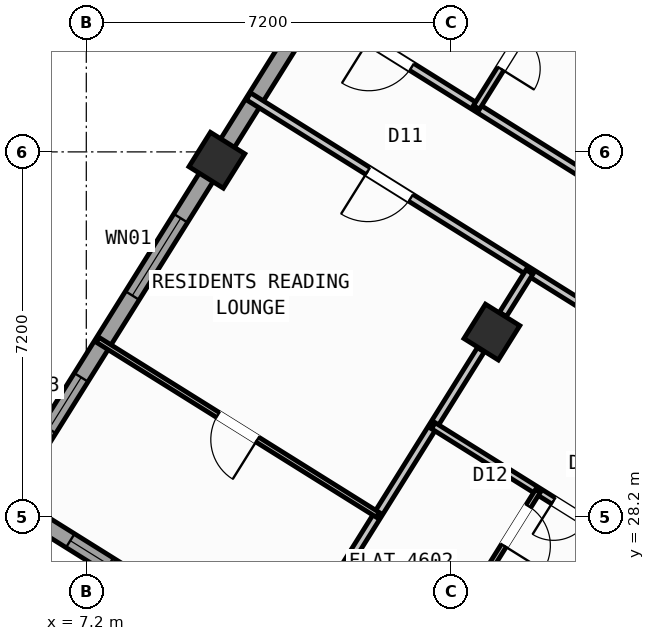
"""IFC4 building model, lengths in metres.
Left out: names, types, materials, properties, quantities, classifications, styles, units other than length and angle.
Written with IfcOpenShell. Run it as: python <this file> out.ifc"""

import sys

from ifc_helpers import new_model, si_unit, direction, frame, frame_2d, origin, origin_2d, place, context, subcontext, project, spatial, rectangle, hollow_rectangle, extrude, source, transform, mapped, element, fill, save


model = new_model("IFC4")
c1 = context("Model", 3, precision=1e-05, world=origin(), true_north=direction((0.0, 1.0)))
c2 = subcontext(c1, "Body", "Model", "MODEL_VIEW")
j1 = project(units=[si_unit("LENGTHUNIT", "METRE"), si_unit("PLANEANGLEUNIT", "RADIAN")], contexts=[c1])
p1 = place(None, origin())
s1 = spatial("IfcSite", under=j1, at=p1, CompositionType="ELEMENT")
p2 = place(p1, origin())
s2 = spatial("IfcBuilding", under=s1, at=p2, CompositionType="ELEMENT")
p3 = place(p2, frame((0.0, 0.0, 184.2)))
s3 = spatial("IfcBuildingStorey", under=s2, at=p3, CompositionType="ELEMENT", Elevation=184.2)
m1 = source(origin(), c2, "Body", "SweptSolid", [
    extrude(hollow_rectangle(XDim=0.8, YDim=0.8, WallThickness=0.032, at=origin_2d()), origin(), (0.0, 0.0, 1.0), 3.6),
])
for number, where, z_axis, x_axis in (
    (1, (15.205, 31.844, 0.0), (0.0, 0.0, 1.0), (-0.848, 0.53, 0.0)),
    (2, (9.777, 35.235, 0.0), (0.0, 0.0, 1.0), (-0.848, 0.53, 0.0)),
):
    element("IfcColumn", number, at=place(p3, frame(where, z_axis=z_axis, x_axis=x_axis)), inside=s3, PredefinedType="COLUMN", context=c2, shape_type="MappedRepresentation", body=[
        mapped(m1, transform((0.0, 0.0, 0.0), scale=1.0)),
    ])
p4 = place(p3, frame((31.76, 12.183, 0.0), z_axis=(0.0, 0.0, 1.0), x_axis=(-0.848047074256, 0.529920899612, 0.0)))
e3 = element("IfcWall", 3, at=p4, inside=s3, PredefinedType="STANDARD", context=c2, shape_type="SweptSolid", body=[
    extrude(rectangle(XDim=30.652, YDim=0.32, at=frame_2d((15.326, 0.0))), origin(), (0.0, 0.0, 1.0), 3.35),
])
p5 = place(p4, frame((15.166, 0.0, 0.0)))
e4 = element("IfcOpeningElement", 4, at=p5, cuts=e3, PredefinedType="OPENING", context=c2, shape_type="SweptSolid", body=[
    extrude(rectangle(XDim=1.2, YDim=2.15, at=frame_2d((0.6, 1.075))), frame((0.0, 0.17, 0.0), z_axis=(0.0, -1.0, 0.0), x_axis=(1.0, 0.0, 0.0)), (0.0, 0.0, 1.0), 0.34),
])
p6 = place(p4, frame((2.015, 0.0, 0.8)))
e5 = element("IfcOpeningElement", 5, at=p6, cuts=e3, PredefinedType="OPENING", context=c2, shape_type="SweptSolid", body=[
    extrude(rectangle(XDim=2.1, YDim=1.55, at=frame_2d((1.05, 0.775))), frame((0.0, 0.17, 0.0), z_axis=(0.0, -1.0, 0.0), x_axis=(1.0, 0.0, 0.0)), (0.0, 0.0, 1.0), 0.34),
])
p7 = place(p4, frame((7.244, 0.0, 0.8)))
e6 = element("IfcOpeningElement", 6, at=p7, cuts=e3, PredefinedType="OPENING", context=c2, shape_type="SweptSolid", body=[
    extrude(rectangle(XDim=2.1, YDim=1.55, at=frame_2d((1.05, 0.775))), frame((0.0, 0.17, 0.0), z_axis=(0.0, -1.0, 0.0), x_axis=(1.0, 0.0, 0.0)), (0.0, 0.0, 1.0), 0.34),
])
p8 = place(p4, frame((12.623, 0.0, 1.0)))
e7 = element("IfcOpeningElement", 7, at=p8, cuts=e3, PredefinedType="OPENING", context=c2, shape_type="SweptSolid", body=[
    extrude(rectangle(XDim=0.9, YDim=1.25, at=frame_2d((0.45, 0.625))), frame((0.0, 0.17, 0.0), z_axis=(0.0, -1.0, 0.0), x_axis=(1.0, 0.0, 0.0)), (0.0, 0.0, 1.0), 0.34),
])
p9 = place(p4, frame((19.565, 0.0, 0.95)))
e8 = element("IfcOpeningElement", 8, at=p9, cuts=e3, PredefinedType="OPENING", context=c2, shape_type="SweptSolid", body=[
    extrude(rectangle(XDim=1.2, YDim=1.4, at=frame_2d((0.6, 0.7))), frame((0.0, 0.17, 0.0), z_axis=(0.0, -1.0, 0.0), x_axis=(1.0, 0.0, 0.0)), (0.0, 0.0, 1.0), 0.34),
])
p10 = place(p4, frame((25.983, 0.0, 1.0)))
e9 = element("IfcOpeningElement", 9, at=p10, cuts=e3, PredefinedType="OPENING", context=c2, shape_type="SweptSolid", body=[
    extrude(rectangle(XDim=0.9, YDim=1.25, at=frame_2d((0.45, 0.625))), frame((0.0, 0.17, 0.0), z_axis=(0.0, -1.0, 0.0), x_axis=(1.0, 0.0, 0.0)), (0.0, 0.0, 1.0), 0.34),
])
p11 = place(p4, frame((28.433, 0.0, 1.0)))
e10 = element("IfcOpeningElement", 10, at=p11, cuts=e3, PredefinedType="OPENING", context=c2, shape_type="SweptSolid", body=[
    extrude(rectangle(XDim=0.9, YDim=1.25, at=frame_2d((0.45, 0.625))), frame((0.0, 0.17, 0.0), z_axis=(0.0, -1.0, 0.0), x_axis=(1.0, 0.0, 0.0)), (0.0, 0.0, 1.0), 0.34),
])
p12 = place(p3, frame((5.7, 28.71, 0.0), z_axis=(0.0, 0.0, 1.0), x_axis=(0.529923711467, 0.8480453172, 0.0)))
e11 = element("IfcWall", 11, at=p12, inside=s3, PredefinedType="STANDARD", context=c2, shape_type="SweptSolid", body=[
    extrude(rectangle(XDim=21.587, YDim=0.32, at=frame_2d((10.794, 0.0))), origin(), (0.0, 0.0, 1.0), 2.825),
])
p13 = place(p12, frame((1.44, 0.0, 0.95)))
e12 = element("IfcOpeningElement", 12, at=p13, cuts=e11, PredefinedType="OPENING", context=c2, shape_type="SweptSolid", body=[
    extrude(rectangle(XDim=1.2, YDim=1.4, at=frame_2d((0.6, 0.7))), frame((0.0, 0.17, 0.0), z_axis=(0.0, -1.0, 0.0), x_axis=(1.0, 0.0, 0.0)), (0.0, 0.0, 1.0), 0.34),
])
p14 = place(p12, frame((4.545, 0.0, 0.85)))
e13 = element("IfcOpeningElement", 13, at=p14, cuts=e11, PredefinedType="OPENING", context=c2, shape_type="SweptSolid", body=[
    extrude(rectangle(XDim=1.8, YDim=1.5, at=frame_2d((0.9, 0.75))), frame((0.0, 0.17, 0.0), z_axis=(0.0, -1.0, 0.0), x_axis=(1.0, 0.0, 0.0)), (0.0, 0.0, 1.0), 0.34),
])
p15 = place(p12, frame((12.139, 0.0, 1.0)))
e14 = element("IfcOpeningElement", 14, at=p15, cuts=e11, PredefinedType="OPENING", context=c2, shape_type="SweptSolid", body=[
    extrude(rectangle(XDim=0.9, YDim=1.25, at=frame_2d((0.45, 0.625))), frame((0.0, 0.17, 0.0), z_axis=(0.0, -1.0, 0.0), x_axis=(1.0, 0.0, 0.0)), (0.0, 0.0, 1.0), 0.34),
])
p16 = place(p12, frame((16.35, 0.0, 0.95)))
e15 = element("IfcOpeningElement", 15, at=p16, cuts=e11, PredefinedType="OPENING", context=c2, shape_type="SweptSolid", body=[
    extrude(rectangle(XDim=1.2, YDim=1.4, at=frame_2d((0.6, 0.7))), frame((0.0, 0.17, 0.0), z_axis=(0.0, -1.0, 0.0), x_axis=(1.0, 0.0, 0.0)), (0.0, 0.0, 1.0), 0.34),
])
p17 = place(p12, frame((18.762, 0.0, 0.95)))
e16 = element("IfcOpeningElement", 16, at=p17, cuts=e11, PredefinedType="OPENING", context=c2, shape_type="SweptSolid", body=[
    extrude(rectangle(XDim=1.2, YDim=1.4, at=frame_2d((0.6, 0.7))), frame((0.0, 0.17, 0.0), z_axis=(0.0, -1.0, 0.0), x_axis=(1.0, 0.0, 0.0)), (0.0, 0.0, 1.0), 0.34),
])
p18 = place(p3, frame((25.754, 29.497, 0.0), z_axis=(0.0, 0.0, 1.0), x_axis=(-0.848045850158, 0.529922858565, 0.0)))
e17 = element("IfcWall", 17, at=p18, inside=s3, PredefinedType="PARTITIONING", context=c2, shape_type="SweptSolid", body=[
    extrude(rectangle(XDim=16.73, YDim=0.16, at=frame_2d((8.365, 0.0))), origin(), (0.0, 0.0, 1.0), 3.34),
])
p19 = place(p18, frame((2.22, 0.0, 0.0)))
e18 = element("IfcOpeningElement", 18, at=p19, cuts=e17, PredefinedType="OPENING", context=c2, shape_type="SweptSolid", body=[
    extrude(rectangle(XDim=0.86, YDim=2.05, at=frame_2d((0.43, 1.025))), frame((0.0, 0.09, 0.0), z_axis=(0.0, -1.0, 0.0), x_axis=(1.0, 0.0, 0.0)), (0.0, 0.0, 1.0), 0.18),
])
p20 = place(p18, frame((6.49, 0.0, 0.0)))
e19 = element("IfcOpeningElement", 19, at=p20, cuts=e17, PredefinedType="OPENING", context=c2, shape_type="SweptSolid", body=[
    extrude(rectangle(XDim=1.0, YDim=2.1, at=frame_2d((0.5, 1.05))), frame((0.0, 0.09, 0.0), z_axis=(0.0, -1.0, 0.0), x_axis=(1.0, 0.0, 0.0)), (0.0, 0.0, 1.0), 0.18),
])
p21 = place(p18, frame((14.304, 0.0, 0.0)))
e20 = element("IfcOpeningElement", 20, at=p21, cuts=e17, PredefinedType="OPENING", context=c2, shape_type="SweptSolid", body=[
    extrude(rectangle(XDim=1.0, YDim=2.1, at=frame_2d((0.5, 1.05))), frame((0.0, 0.09, 0.0), z_axis=(0.0, -1.0, 0.0), x_axis=(1.0, 0.0, 0.0)), (0.0, 0.0, 1.0), 0.18),
])
p22 = place(p3, frame((24.588, 27.631, 0.0), z_axis=(0.0, 0.0, 1.0), x_axis=(-0.848041752158, 0.529929416617, 0.0)))
e21 = element("IfcWall", 21, at=p22, inside=s3, PredefinedType="PARTITIONING", context=c2, shape_type="SweptSolid", body=[
    extrude(rectangle(XDim=16.73, YDim=0.16, at=frame_2d((8.365, 0.0))), origin(), (0.0, 0.0, 1.0), 3.34),
])
p23 = place(p22, frame((2.22, 0.0, 0.0)))
e22 = element("IfcOpeningElement", 22, at=p23, cuts=e21, PredefinedType="OPENING", context=c2, shape_type="SweptSolid", body=[
    extrude(rectangle(XDim=0.86, YDim=2.05, at=frame_2d((0.43, 1.025))), frame((0.0, 0.09, 0.0), z_axis=(0.0, -1.0, 0.0), x_axis=(1.0, 0.0, 0.0)), (0.0, 0.0, 1.0), 0.18),
])
p24 = place(p22, frame((7.82, 0.0, 0.0)))
e23 = element("IfcOpeningElement", 23, at=p24, cuts=e21, PredefinedType="OPENING", context=c2, shape_type="SweptSolid", body=[
    extrude(rectangle(XDim=1.0, YDim=2.1, at=frame_2d((0.5, 1.05))), frame((0.0, 0.09, 0.0), z_axis=(0.0, -1.0, 0.0), x_axis=(1.0, 0.0, 0.0)), (0.0, 0.0, 1.0), 0.18),
])
p25 = place(p22, frame((12.95, 0.0, 0.0)))
e24 = element("IfcOpeningElement", 24, at=p25, cuts=e21, PredefinedType="OPENING", context=c2, shape_type="SweptSolid", body=[
    extrude(rectangle(XDim=1.0, YDim=2.1, at=frame_2d((0.5, 1.05))), frame((0.0, 0.09, 0.0), z_axis=(0.0, -1.0, 0.0), x_axis=(1.0, 0.0, 0.0)), (0.0, 0.0, 1.0), 0.18),
])
p26 = place(p3, frame((15.946, 33.031, 0.0), z_axis=(0.0, 0.0, 1.0), x_axis=(-0.529821225456, -0.848109349704, 0.0)))
e25 = element("IfcWall", 25, at=p26, inside=s3, PredefinedType="PARTITIONING", context=c2, shape_type="SweptSolid", body=[
    extrude(rectangle(XDim=0.988, YDim=0.16, at=frame_2d((0.494, 0.0))), origin(), (0.0, 0.0, 1.0), 2.825),
])
p27 = place(p3, frame((14.986, 31.494, 0.0), z_axis=(0.0, 0.0, 1.0), x_axis=(-0.529907440938, -0.848055484057, 0.0)))
e26 = element("IfcWall", 26, at=p27, inside=s3, PredefinedType="PARTITIONING", context=c2, shape_type="SweptSolid", body=[
    extrude(rectangle(XDim=6.476, YDim=0.16, at=frame_2d((3.238, 0.0))), origin(), (0.0, 0.0, 1.0), 2.825),
])
p28 = place(p3, frame((19.477, 26.603, 0.0), z_axis=(0.0, 0.0, 1.0), x_axis=(-0.848039019877, 0.529933789039, 0.0)))
e27 = element("IfcWall", 27, at=p28, inside=s3, PredefinedType="PLUMBINGWALL", context=c2, shape_type="SweptSolid", body=[
    extrude(rectangle(XDim=6.4, YDim=0.14, at=frame_2d((3.2, 0.0))), origin(), (0.0, 0.0, 1.0), 3.34),
])
p29 = place(p28, frame((2.824, 0.0, 0.0)))
e28 = element("IfcOpeningElement", 28, at=p29, cuts=e27, PredefinedType="OPENING", context=c2, shape_type="SweptSolid", body=[
    extrude(rectangle(XDim=0.78, YDim=2.05, at=frame_2d((0.39, 1.025))), frame((0.0, 0.08, 0.0), z_axis=(0.0, -1.0, 0.0), x_axis=(1.0, 0.0, 0.0)), (0.0, 0.0, 1.0), 0.16),
])
p30 = place(p3, frame((16.112, 28.706, 0.0), z_axis=(0.0, 0.0, 1.0), x_axis=(-0.529916267533, -0.848049968695, 0.0)))
e29 = element("IfcWall", 29, at=p30, inside=s3, PredefinedType="PARTITIONING", context=c2, shape_type="SweptSolid", body=[
    extrude(rectangle(XDim=5.84, YDim=0.11, at=frame_2d((2.92, 0.0))), origin(), (0.0, 0.0, 1.0), 3.34),
])
p31 = place(p30, frame((0.35, 0.0, 0.0)))
e30 = element("IfcOpeningElement", 30, at=p31, cuts=e29, PredefinedType="OPENING", context=c2, shape_type="SweptSolid", body=[
    extrude(rectangle(XDim=0.92, YDim=2.08, at=frame_2d((0.46, 1.04))), frame((0.0, 0.065, 0.0), z_axis=(0.0, -1.0, 0.0), x_axis=(1.0, 0.0, 0.0)), (0.0, 0.0, 1.0), 0.13),
])
p32 = place(p3, frame((12.951, 28.238, 0.0), z_axis=(0.0, 0.0, 1.0), x_axis=(-0.848031959833, 0.529945086874, 0.0)))
e31 = element("IfcWall", 31, at=p32, inside=s3, PredefinedType="PARTITIONING", context=c2, shape_type="SweptSolid", body=[
    extrude(rectangle(XDim=6.52, YDim=0.11, at=frame_2d((3.26, 0.0))), origin(), (0.0, 0.0, 1.0), 3.34),
])
p33 = place(p32, frame((2.8, 0.0, 0.0)))
e32 = element("IfcOpeningElement", 32, at=p33, cuts=e31, PredefinedType="OPENING", context=c2, shape_type="SweptSolid", body=[
    extrude(rectangle(XDim=0.92, YDim=2.08, at=frame_2d((0.46, 1.04))), frame((0.0, 0.065, 0.0), z_axis=(0.0, -1.0, 0.0), x_axis=(1.0, 0.0, 0.0)), (0.0, 0.0, 1.0), 0.13),
])
p34 = place(p3, frame((18.479, 37.084, 0.0), z_axis=(0.0, 0.0, 1.0), x_axis=(-0.848048787466, 0.529918157905, 0.0)))
e33 = element("IfcWall", 33, at=p34, inside=s3, PredefinedType="PLUMBINGWALL", context=c2, shape_type="SweptSolid", body=[
    extrude(rectangle(XDim=6.52, YDim=0.14, at=frame_2d((3.26, 0.0))), origin(), (0.0, 0.0, 1.0), 3.34),
])
p35 = place(p34, frame((2.885, 0.0, 0.0)))
e34 = element("IfcOpeningElement", 34, at=p35, cuts=e33, PredefinedType="OPENING", context=c2, shape_type="SweptSolid", body=[
    extrude(rectangle(XDim=0.78, YDim=2.05, at=frame_2d((0.39, 1.025))), frame((0.0, 0.08, 0.0), z_axis=(0.0, -1.0, 0.0), x_axis=(1.0, 0.0, 0.0)), (0.0, 0.0, 1.0), 0.16),
])
p36 = place(p3, frame((16.268, 38.467, 0.0), z_axis=(0.0, 0.0, 1.0), x_axis=(-0.529913878929, -0.848051461244, 0.0)))
e35 = element("IfcWall", 35, at=p36, inside=s3, PredefinedType="PLUMBINGWALL", context=c2, shape_type="SweptSolid", body=[
    extrude(rectangle(XDim=2.58, YDim=0.14, at=frame_2d((1.29, 0.0))), origin(), (0.0, 0.0, 1.0), 3.34),
])
p37 = place(p36, frame((0.9, 0.0, 0.0)))
e36 = element("IfcOpeningElement", 36, at=p37, cuts=e35, PredefinedType="OPENING", context=c2, shape_type="SweptSolid", body=[
    extrude(rectangle(XDim=0.78, YDim=2.05, at=frame_2d((0.39, 1.025))), frame((0.0, 0.08, 0.0), z_axis=(0.0, -1.0, 0.0), x_axis=(1.0, 0.0, 0.0)), (0.0, 0.0, 1.0), 0.16),
])
m2 = source(origin(), c2, "Body", "SweptSolid", [
    extrude(rectangle(XDim=0.9, YDim=1.25, at=frame_2d((0.45, 0.625))), frame((0.0, 0.03, 0.0), z_axis=(0.0, -1.0, 0.0), x_axis=(1.0, 0.0, 0.0)), (0.0, 0.0, 1.0), 0.06),
])
p38 = place(p11, origin())
e37 = element("IfcWindow", 37, at=p38, inside=s3, PartitioningType="SINGLE_PANEL", PredefinedType="WINDOW", context=c2, shape_type="MappedRepresentation", body=[
    mapped(m2, transform((0.0, 0.0, 0.0), scale=1.0)),
])
fill(e10, e37)
m3 = source(origin(), c2, "Body", "SweptSolid", [
    extrude(rectangle(XDim=1.2, YDim=1.4, at=frame_2d((0.6, 0.7))), frame((0.0, 0.03, 0.0), z_axis=(0.0, -1.0, 0.0), x_axis=(1.0, 0.0, 0.0)), (0.0, 0.0, 1.0), 0.06),
])
p39 = place(p13, origin())
e38 = element("IfcWindow", 38, at=p39, inside=s3, PartitioningType="SINGLE_PANEL", PredefinedType="WINDOW", context=c2, shape_type="MappedRepresentation", body=[
    mapped(m3, transform((0.0, 0.0, 0.0), scale=1.0)),
])
fill(e12, e38)
m4 = source(origin(), c2, "Body", "SweptSolid", [
    extrude(rectangle(XDim=1.8, YDim=1.5, at=frame_2d((0.9, 0.75))), frame((0.0, 0.03, 0.0), z_axis=(0.0, -1.0, 0.0), x_axis=(1.0, 0.0, 0.0)), (0.0, 0.0, 1.0), 0.06),
])
p40 = place(p14, origin())
e39 = element("IfcWindow", 39, at=p40, inside=s3, PartitioningType="SINGLE_PANEL", PredefinedType="WINDOW", context=c2, shape_type="MappedRepresentation", body=[
    mapped(m4, transform((0.0, 0.0, 0.0), scale=1.0)),
])
fill(e13, e39)
m5 = source(origin(), c2, "Body", "SweptSolid", [
    extrude(rectangle(XDim=0.92, YDim=2.08, at=frame_2d((0.46, 1.04))), frame((0.0, 0.025, 0.0), z_axis=(0.0, -1.0, 0.0), x_axis=(1.0, 0.0, 0.0)), (0.0, 0.0, 1.0), 0.05),
])
p41 = place(p31, origin())
e40 = element("IfcDoor", 40, at=p41, inside=s3, OperationType="SINGLE_SWING_RIGHT", PredefinedType="DOOR", context=c2, shape_type="MappedRepresentation", body=[
    mapped(m5, transform((0.0, 0.0, 0.0), scale=1.0)),
])
fill(e30, e40)
m6 = source(origin(), c2, "Body", "SweptSolid", [
    extrude(rectangle(XDim=0.78, YDim=2.05, at=frame_2d((0.39, 1.025))), frame((0.0, 0.025, 0.0), z_axis=(0.0, -1.0, 0.0), x_axis=(1.0, 0.0, 0.0)), (0.0, 0.0, 1.0), 0.05),
])
p42 = place(p29, origin())
e41 = element("IfcDoor", 41, at=p42, inside=s3, OperationType="SINGLE_SWING_RIGHT", PredefinedType="DOOR", context=c2, shape_type="MappedRepresentation", body=[
    mapped(m6, transform((0.0, 0.0, 0.0), scale=1.0)),
])
fill(e28, e41)
m7 = source(origin(), c2, "Body", "SweptSolid", [
    extrude(rectangle(XDim=1.0, YDim=2.1, at=frame_2d((0.5, 1.05))), frame((0.0, 0.025, 0.0), z_axis=(0.0, -1.0, 0.0), x_axis=(1.0, 0.0, 0.0)), (0.0, 0.0, 1.0), 0.05),
])
p43 = place(p25, origin())
e42 = element("IfcDoor", 42, at=p43, inside=s3, OperationType="SINGLE_SWING_RIGHT", PredefinedType="DOOR", context=c2, shape_type="MappedRepresentation", body=[
    mapped(m7, transform((0.0, 0.0, 0.0), scale=1.0)),
])
fill(e24, e42)
p44 = place(p33, origin())
e43 = element("IfcDoor", 43, at=p44, inside=s3, OperationType="SINGLE_SWING_LEFT", PredefinedType="DOOR", context=c2, shape_type="MappedRepresentation", body=[
    mapped(m5, transform((0.0, 0.0, 0.0), scale=1.0)),
])
fill(e32, e43)
p45 = place(p21, origin())
e44 = element("IfcDoor", 44, at=p45, inside=s3, OperationType="SINGLE_SWING_RIGHT", PredefinedType="DOOR", context=c2, shape_type="MappedRepresentation", body=[
    mapped(m7, transform((0.0, 0.0, 0.0), scale=1.0)),
])
fill(e20, e44)
p46 = place(p37, origin())
e45 = element("IfcDoor", 45, at=p46, inside=s3, OperationType="SINGLE_SWING_RIGHT", PredefinedType="DOOR", context=c2, shape_type="MappedRepresentation", body=[
    mapped(m6, transform((0.0, 0.0, 0.0), scale=1.0)),
])
fill(e36, e45)
save(model, sys.argv[1])
